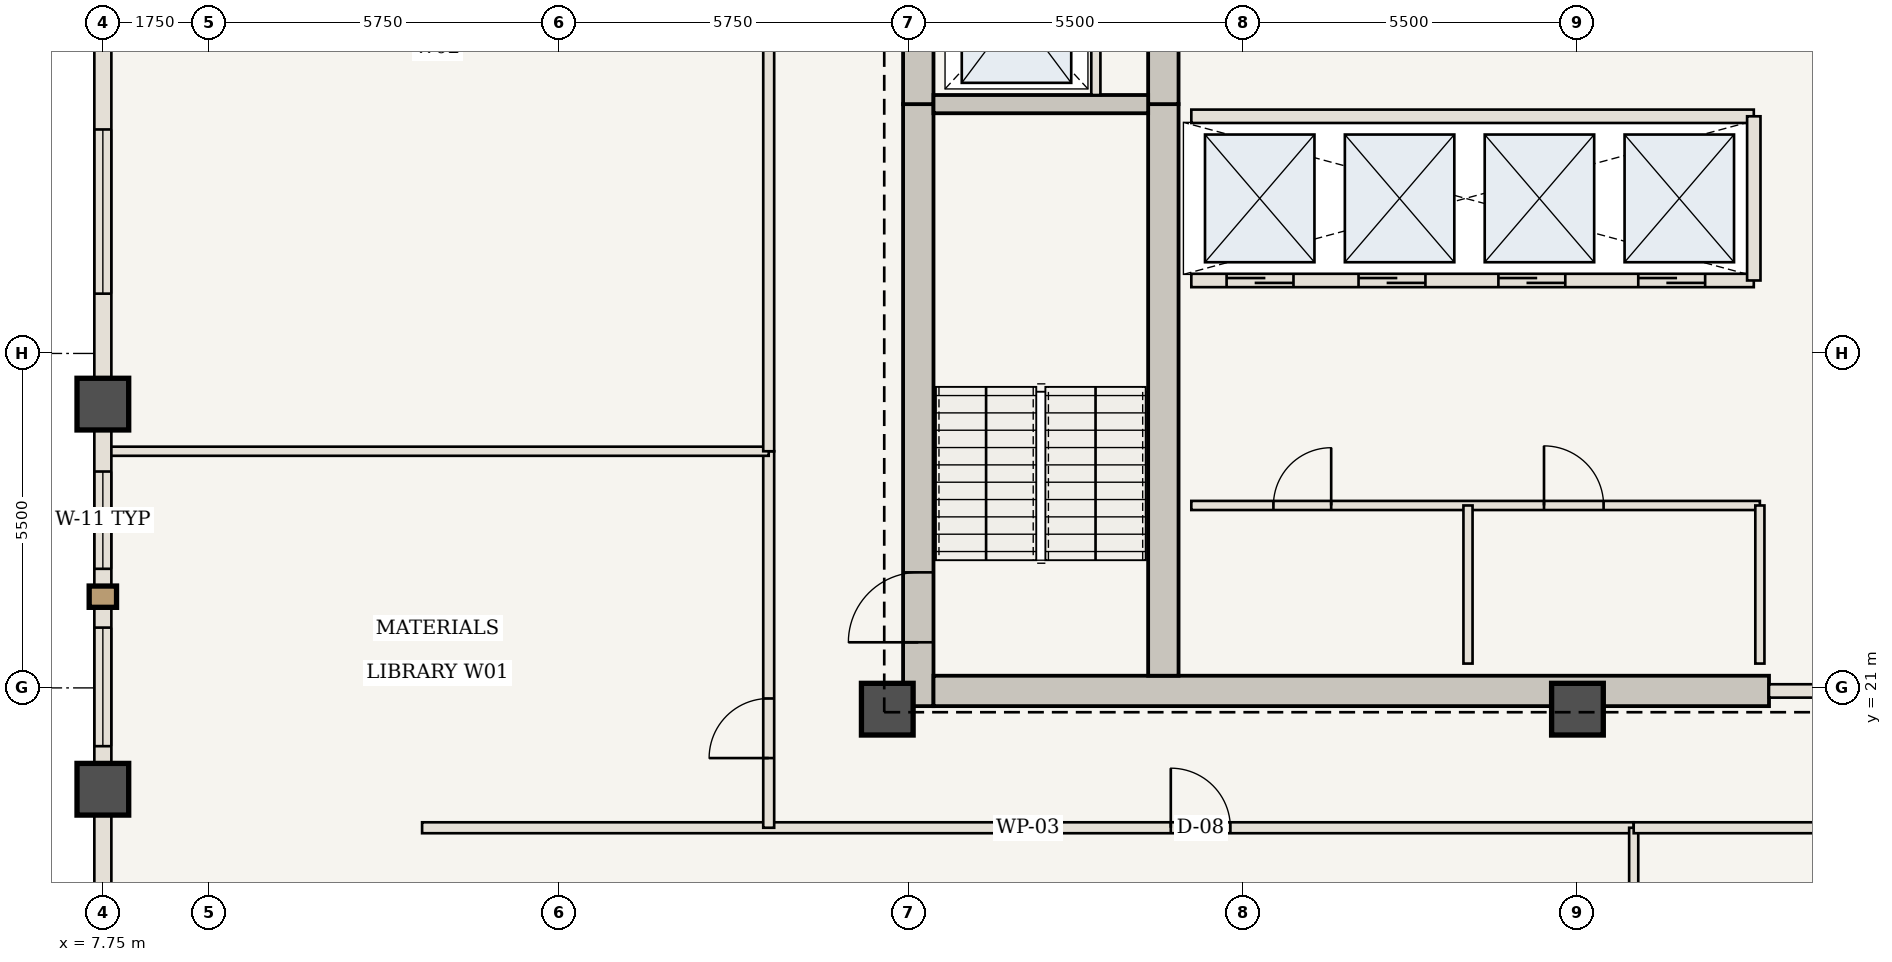
"""IFC4 building model, lengths in metres.
Left out: names, types, materials, properties, quantities, classifications, styles, units other than length and angle.
Written with IfcOpenShell. Run it as: python <this file> out.ifc"""

import sys

from ifc_helpers import new_model, si_unit, direction, frame, frame_2d, origin, origin_2d, place, context, subcontext, project, spatial, rectangle, extrude, element, fill, save


model = new_model("IFC4")
c1 = context("Model", 3, precision=1e-05, world=origin(), true_north=direction((0.0, 1.0)))
c2 = subcontext(c1, "Body", "Model", "MODEL_VIEW")
j1 = project(units=[si_unit("LENGTHUNIT", "METRE"), si_unit("PLANEANGLEUNIT", "RADIAN")], contexts=[c1])
p1 = place(None, origin())
s1 = spatial("IfcSite", under=j1, at=p1, CompositionType="ELEMENT")
p2 = place(p1, origin())
s2 = spatial("IfcBuilding", under=s1, at=p2, CompositionType="ELEMENT")
p3 = place(p2, frame((0.0, 0.0, 210.0)))
s3 = spatial("IfcBuildingStorey", under=s2, at=p3, CompositionType="ELEMENT", Elevation=210.0)
p4 = place(p3, frame((21.16, 20.7, 0.0), z_axis=(0.0, 0.0, 1.0), x_axis=(0.0, 1.0, 0.0)))
e1 = element("IfcWall", 1, at=p4, inside=s3, PredefinedType="SHEAR", context=c2, shape_type="SweptSolid", body=[
    extrude(rectangle(XDim=9.9, YDim=0.5, at=frame_2d((4.95, 0.0))), origin(), (0.0, 0.0, 1.0), 3.85),
])
p5 = place(p4, frame((1.05, 0.0, 0.0)))
e2 = element("IfcOpeningElement", 2, at=p5, cuts=e1, PredefinedType="OPENING", context=c2, shape_type="SweptSolid", body=[
    extrude(rectangle(XDim=1.15, YDim=2.15, at=frame_2d((0.575, 1.075))), frame((0.0, 0.26, 0.0), z_axis=(0.0, -1.0, 0.0), x_axis=(1.0, 0.0, 0.0)), (0.0, 0.0, 1.0), 0.52),
])
p6 = place(p3, frame((21.16, 30.6, 0.0), z_axis=(0.0, 0.0, 1.0), x_axis=(0.0, 1.0, 0.0)))
e3 = element("IfcWall", 3, at=p6, inside=s3, PredefinedType="SHEAR", context=c2, shape_type="SweptSolid", body=[
    extrude(rectangle(XDim=12.65, YDim=0.5, at=frame_2d((6.325, 0.0))), origin(), (0.0, 0.0, 1.0), 3.85),
])
p7 = place(p6, frame((4.2, 0.0, 0.0)))
e4 = element("IfcOpeningElement", 4, at=p7, cuts=e3, PredefinedType="OPENING", context=c2, shape_type="SweptSolid", body=[
    extrude(rectangle(XDim=1.1, YDim=2.15, at=frame_2d((0.55, 1.075))), frame((0.0, 0.26, 0.0), z_axis=(0.0, -1.0, 0.0), x_axis=(1.0, 0.0, 0.0)), (0.0, 0.0, 1.0), 0.52),
])
p8 = place(p6, frame((9.2, 0.0, 0.0)))
e5 = element("IfcOpeningElement", 5, at=p8, cuts=e3, PredefinedType="OPENING", context=c2, shape_type="SweptSolid", body=[
    extrude(rectangle(XDim=0.92, YDim=2.1, at=frame_2d((0.46, 1.05))), frame((0.0, 0.26, 0.0), z_axis=(0.0, -1.0, 0.0), x_axis=(1.0, 0.0, 0.0)), (0.0, 0.0, 1.0), 0.52),
])
p9 = place(p3, frame((21.41, 20.95, 0.0), z_axis=(0.0, 0.0, 1.0), x_axis=(1.0, 0.0, 0.0)))
e6 = element("IfcWall", 6, at=p9, inside=s3, PredefinedType="SHEAR", context=c2, shape_type="SweptSolid", body=[
    extrude(rectangle(XDim=13.74, YDim=0.5, at=frame_2d((6.87, 0.0))), origin(), (0.0, 0.0, 1.0), 3.85),
])
p10 = place(p3, frame((25.19, 21.2, 0.0), z_axis=(0.0, 0.0, 1.0), x_axis=(0.0, 1.0, 0.0)))
e7 = element("IfcWall", 7, at=p10, inside=s3, PredefinedType="SHEAR", context=c2, shape_type="SweptSolid", body=[
    extrude(rectangle(XDim=9.4, YDim=0.5, at=frame_2d((4.7, 0.0))), origin(), (0.0, 0.0, 1.0), 3.85),
])
p11 = place(p3, frame((25.19, 30.6, 0.0), z_axis=(0.0, 0.0, 1.0), x_axis=(0.0, 1.0, 0.0)))
e8 = element("IfcWall", 8, at=p11, inside=s3, PredefinedType="SHEAR", context=c2, shape_type="SweptSolid", body=[
    extrude(rectangle(XDim=12.15, YDim=0.5, at=frame_2d((6.075, 0.0))), origin(), (0.0, 0.0, 1.0), 3.85),
])
p12 = place(p11, frame((6.25, 0.0, 0.0)))
e9 = element("IfcOpeningElement", 9, at=p12, cuts=e8, PredefinedType="OPENING", context=c2, shape_type="SweptSolid", body=[
    extrude(rectangle(XDim=1.1, YDim=2.15, at=frame_2d((0.55, 1.075))), frame((0.0, 0.26, 0.0), z_axis=(0.0, -1.0, 0.0), x_axis=(1.0, 0.0, 0.0)), (0.0, 0.0, 1.0), 0.52),
])
for number, where, z_axis, x_axis in (
    (10, (20.65, 20.65, 0.0), (0.0, 0.0, 1.0), (1.0, 0.0, 0.0)),
    (11, (32.0, 20.65, 0.0), (0.0, 0.0, 1.0), (1.0, 0.0, 0.0)),
    (12, (7.75, 19.333, 0.0), (0.0, 0.0, 1.0), (1.0, 0.0, 0.0)),
    (13, (7.75, 25.667, 0.0), (0.0, 0.0, 1.0), (1.0, 0.0, 0.0)),
):
    element("IfcColumn", number, at=place(p3, frame(where, z_axis=z_axis, x_axis=x_axis)), inside=s3, PredefinedType="COLUMN", context=c2, shape_type="SweptSolid", body=[
        extrude(rectangle(XDim=0.85, YDim=0.85, at=origin_2d()), origin(), (0.0, 0.0, 1.0), 3.85),
    ])
p13 = place(p3, frame((21.41, 30.6, 0.0), z_axis=(0.0, 0.0, 1.0), x_axis=(1.0, 0.0, 0.0)))
e14 = element("IfcWall", 14, at=p13, inside=s3, PredefinedType="SHEAR", context=c2, shape_type="SweptSolid", body=[
    extrude(rectangle(XDim=3.53, YDim=0.3, at=frame_2d((1.765, 0.0))), origin(), (0.0, 0.0, 1.0), 3.685),
])
p14 = place(p3, frame((24.08, 30.75, 0.0), z_axis=(0.0, 0.0, 1.0), x_axis=(0.0, 1.0, 0.0)))
e15 = element("IfcWall", 15, at=p14, inside=s3, PredefinedType="STANDARD", context=c2, shape_type="SweptSolid", body=[
    extrude(rectangle(XDim=2.65, YDim=0.15, at=frame_2d((1.325, 0.0))), origin(), (0.0, 0.0, 1.0), 3.685),
])
p15 = place(p3, frame((35.15, 20.95, 0.0), z_axis=(0.0, 0.0, 1.0), x_axis=(1.0, 0.0, 0.0)))
e16 = element("IfcWall", 16, at=p15, inside=s3, PredefinedType="STANDARD", context=c2, shape_type="SweptSolid", body=[
    extrude(rectangle(XDim=3.3, YDim=0.22, at=frame_2d((1.65, 0.0))), origin(), (0.0, 0.0, 1.0), 3.685),
])
p16 = place(p15, frame((1.1, 0.0, 0.0)))
e17 = element("IfcOpeningElement", 17, at=p16, cuts=e16, PredefinedType="OPENING", context=c2, shape_type="SweptSolid", body=[
    extrude(rectangle(XDim=1.1, YDim=2.15, at=frame_2d((0.55, 1.075))), frame((0.0, 0.12, 0.0), z_axis=(0.0, -1.0, 0.0), x_axis=(1.0, 0.0, 0.0)), (0.0, 0.0, 1.0), 0.24),
])
p17 = place(p3, frame((25.65, 24.0, 0.0), z_axis=(0.0, 0.0, 1.0), x_axis=(1.0, 0.0, 0.0)))
e18 = element("IfcWall", 18, at=p17, inside=s3, PredefinedType="STANDARD", context=c2, shape_type="SweptSolid", body=[
    extrude(rectangle(XDim=9.35, YDim=0.15, at=frame_2d((4.675, 0.0))), origin(), (0.0, 0.0, 1.0), 3.685),
])
p18 = place(p17, frame((1.35, 0.0, 0.0)))
e19 = element("IfcOpeningElement", 19, at=p18, cuts=e18, PredefinedType="OPENING", context=c2, shape_type="SweptSolid", body=[
    extrude(rectangle(XDim=0.95, YDim=2.15, at=frame_2d((0.475, 1.075))), frame((0.0, 0.085, 0.0), z_axis=(0.0, -1.0, 0.0), x_axis=(1.0, 0.0, 0.0)), (0.0, 0.0, 1.0), 0.17),
])
p19 = place(p17, frame((5.8, 0.0, 0.0)))
e20 = element("IfcOpeningElement", 20, at=p19, cuts=e18, PredefinedType="OPENING", context=c2, shape_type="SweptSolid", body=[
    extrude(rectangle(XDim=0.98, YDim=2.2, at=frame_2d((0.49, 1.1))), frame((0.0, 0.085, 0.0), z_axis=(0.0, -1.0, 0.0), x_axis=(1.0, 0.0, 0.0)), (0.0, 0.0, 1.0), 0.17),
])
for number, where, z_axis, x_axis in (
    (21, (30.2, 21.4, 0.0), (0.0, 0.0, 1.0), (0.0, 1.0, 0.0)),
    (22, (35.0, 21.4, 0.0), (0.0, 0.0, 1.0), (0.0, 1.0, 0.0)),
):
    element("IfcWall", number, at=place(p3, frame(where, z_axis=z_axis, x_axis=x_axis)), inside=s3, PredefinedType="STANDARD", context=c2, shape_type="SweptSolid", body=[
        extrude(rectangle(XDim=2.6, YDim=0.15, at=frame_2d((1.3, 0.0))), origin(), (0.0, 0.0, 1.0), 3.685),
    ])
p20 = place(p3, frame((25.65, 27.7, 0.0), z_axis=(0.0, 0.0, 1.0), x_axis=(1.0, 0.0, 0.0)))
e23 = element("IfcWall", 23, at=p20, inside=s3, PredefinedType="STANDARD", context=c2, shape_type="SweptSolid", body=[
    extrude(rectangle(XDim=9.25, YDim=0.22, at=frame_2d((4.625, 0.0))), origin(), (0.0, 0.0, 1.0), 3.685),
])
p21 = place(p20, frame((0.58, 0.0, 0.0)))
e24 = element("IfcOpeningElement", 24, at=p21, cuts=e23, PredefinedType="OPENING", context=c2, shape_type="SweptSolid", body=[
    extrude(rectangle(XDim=1.1, YDim=2.15, at=frame_2d((0.55, 1.075))), frame((0.0, 0.12, 0.0), z_axis=(0.0, -1.0, 0.0), x_axis=(1.0, 0.0, 0.0)), (0.0, 0.0, 1.0), 0.24),
])
p22 = place(p20, frame((2.75, 0.0, 0.0)))
e25 = element("IfcOpeningElement", 25, at=p22, cuts=e23, PredefinedType="OPENING", context=c2, shape_type="SweptSolid", body=[
    extrude(rectangle(XDim=1.1, YDim=2.15, at=frame_2d((0.55, 1.075))), frame((0.0, 0.12, 0.0), z_axis=(0.0, -1.0, 0.0), x_axis=(1.0, 0.0, 0.0)), (0.0, 0.0, 1.0), 0.24),
])
p23 = place(p20, frame((5.05, 0.0, 0.0)))
e26 = element("IfcOpeningElement", 26, at=p23, cuts=e23, PredefinedType="OPENING", context=c2, shape_type="SweptSolid", body=[
    extrude(rectangle(XDim=1.1, YDim=2.15, at=frame_2d((0.55, 1.075))), frame((0.0, 0.12, 0.0), z_axis=(0.0, -1.0, 0.0), x_axis=(1.0, 0.0, 0.0)), (0.0, 0.0, 1.0), 0.24),
])
p24 = place(p20, frame((7.35, 0.0, 0.0)))
e27 = element("IfcOpeningElement", 27, at=p24, cuts=e23, PredefinedType="OPENING", context=c2, shape_type="SweptSolid", body=[
    extrude(rectangle(XDim=1.1, YDim=2.15, at=frame_2d((0.55, 1.075))), frame((0.0, 0.12, 0.0), z_axis=(0.0, -1.0, 0.0), x_axis=(1.0, 0.0, 0.0)), (0.0, 0.0, 1.0), 0.24),
])
p25 = place(p3, frame((25.65, 30.4, 0.0), z_axis=(0.0, 0.0, 1.0), x_axis=(1.0, 0.0, 0.0)))
e28 = element("IfcWall", 28, at=p25, inside=s3, PredefinedType="STANDARD", context=c2, shape_type="SweptSolid", body=[
    extrude(rectangle(XDim=9.25, YDim=0.22, at=frame_2d((4.625, 0.0))), origin(), (0.0, 0.0, 1.0), 3.685),
])
p26 = place(p3, frame((34.9, 27.7, 0.0), z_axis=(0.0, 0.0, 1.0), x_axis=(0.0, 1.0, 0.0)))
e29 = element("IfcWall", 29, at=p26, inside=s3, PredefinedType="STANDARD", context=c2, shape_type="SweptSolid", body=[
    extrude(rectangle(XDim=2.7, YDim=0.22, at=frame_2d((1.35, 0.0))), origin(), (0.0, 0.0, 1.0), 3.685),
])
p27 = place(p3, frame((13.0, 18.7, 0.0), z_axis=(0.0, 0.0, 1.0), x_axis=(1.0, 0.0, 0.0)))
e30 = element("IfcWall", 30, at=p27, inside=s3, PredefinedType="STANDARD", context=c2, shape_type="SweptSolid", body=[
    extrude(rectangle(XDim=19.925, YDim=0.18, at=frame_2d((9.962, 0.0))), origin(), (0.0, 0.0, 1.0), 3.685),
])
p28 = place(p27, frame((12.312, 0.0, 0.0)))
e31 = element("IfcOpeningElement", 31, at=p28, cuts=e30, PredefinedType="OPENING", context=c2, shape_type="SweptSolid", body=[
    extrude(rectangle(XDim=0.98, YDim=2.2, at=frame_2d((0.49, 1.1))), frame((0.0, 0.1, 0.0), z_axis=(0.0, -1.0, 0.0), x_axis=(1.0, 0.0, 0.0)), (0.0, 0.0, 1.0), 0.2),
])
p29 = place(p3, frame((32.925, 7.81, 0.0), z_axis=(0.0, 0.0, 1.0), x_axis=(0.0, 1.0, 0.0)))
e32 = element("IfcWall", 32, at=p29, inside=s3, PredefinedType="STANDARD", context=c2, shape_type="SweptSolid", body=[
    extrude(rectangle(XDim=10.89, YDim=0.15, at=frame_2d((5.445, 0.0))), origin(), (0.0, 0.0, 1.0), 3.685),
])
p30 = place(p3, frame((32.925, 18.7, 0.0), z_axis=(0.0, 0.0, 1.0), x_axis=(1.0, 0.0, 0.0)))
e33 = element("IfcWall", 33, at=p30, inside=s3, PredefinedType="STANDARD", context=c2, shape_type="SweptSolid", body=[
    extrude(rectangle(XDim=18.075, YDim=0.18, at=frame_2d((9.038, 0.0))), origin(), (0.0, 0.0, 1.0), 3.685),
])
p31 = place(p30, frame((5.812, 0.0, 0.0)))
e34 = element("IfcOpeningElement", 34, at=p31, cuts=e33, PredefinedType="OPENING", context=c2, shape_type="SweptSolid", body=[
    extrude(rectangle(XDim=0.98, YDim=2.2, at=frame_2d((0.49, 1.1))), frame((0.0, 0.1, 0.0), z_axis=(0.0, -1.0, 0.0), x_axis=(1.0, 0.0, 0.0)), (0.0, 0.0, 1.0), 0.2),
])
p32 = place(p3, frame((18.7, 18.7, 0.0), z_axis=(0.0, 0.0, 1.0), x_axis=(0.0, 1.0, 0.0)))
e35 = element("IfcWall", 35, at=p32, inside=s3, PredefinedType="STANDARD", context=c2, shape_type="SweptSolid", body=[
    extrude(rectangle(XDim=6.192, YDim=0.18, at=frame_2d((3.096, 0.0))), origin(), (0.0, 0.0, 1.0), 3.685),
])
p33 = place(p32, frame((1.146, 0.0, 0.0)))
e36 = element("IfcOpeningElement", 36, at=p33, cuts=e35, PredefinedType="OPENING", context=c2, shape_type="SweptSolid", body=[
    extrude(rectangle(XDim=0.98, YDim=2.2, at=frame_2d((0.49, 1.1))), frame((0.0, 0.1, 0.0), z_axis=(0.0, -1.0, 0.0), x_axis=(1.0, 0.0, 0.0)), (0.0, 0.0, 1.0), 0.2),
])
p34 = place(p3, frame((7.81, 24.892, 0.0), z_axis=(0.0, 0.0, 1.0), x_axis=(1.0, 0.0, 0.0)))
e37 = element("IfcWall", 37, at=p34, inside=s3, PredefinedType="STANDARD", context=c2, shape_type="SweptSolid", body=[
    extrude(rectangle(XDim=10.89, YDim=0.15, at=frame_2d((5.445, 0.0))), origin(), (0.0, 0.0, 1.0), 3.685),
])
p35 = place(p3, frame((18.7, 24.892, 0.0), z_axis=(0.0, 0.0, 1.0), x_axis=(0.0, 1.0, 0.0)))
e38 = element("IfcWall", 38, at=p35, inside=s3, PredefinedType="STANDARD", context=c2, shape_type="SweptSolid", body=[
    extrude(rectangle(XDim=14.367, YDim=0.18, at=frame_2d((7.183, 0.0))), origin(), (0.0, 0.0, 1.0), 3.685),
])
p36 = place(p35, frame((8.133, 0.0, 0.0)))
e39 = element("IfcOpeningElement", 39, at=p36, cuts=e38, PredefinedType="OPENING", context=c2, shape_type="SweptSolid", body=[
    extrude(rectangle(XDim=0.98, YDim=2.2, at=frame_2d((0.49, 1.1))), frame((0.0, 0.1, 0.0), z_axis=(0.0, -1.0, 0.0), x_axis=(1.0, 0.0, 0.0)), (0.0, 0.0, 1.0), 0.2),
])
p37 = place(p3, frame((7.75, 13.0, 0.0), z_axis=(0.0, 0.0, 1.0), x_axis=(0.0, 1.0, 0.0)))
e40 = element("IfcWall", 40, at=p37, inside=s3, PredefinedType="USERDEFINED", context=c2, shape_type="SweptSolid", body=[
    extrude(rectangle(XDim=6.333, YDim=0.28, at=frame_2d((3.167, 0.0))), origin(), (0.0, 0.0, 1.0), 2.985),
])
p38 = place(p3, frame((7.75, 19.333, 0.0), z_axis=(0.0, 0.0, 1.0), x_axis=(0.0, 1.0, 0.0)))
e41 = element("IfcWall", 41, at=p38, inside=s3, PredefinedType="USERDEFINED", context=c2, shape_type="SweptSolid", body=[
    extrude(rectangle(XDim=6.333, YDim=0.28, at=frame_2d((3.167, 0.0))), origin(), (0.0, 0.0, 1.0), 2.985),
])
p39 = place(p38, frame((0.708, 0.0, 0.85)))
e42 = element("IfcOpeningElement", 42, at=p39, cuts=e41, PredefinedType="OPENING", context=c2, shape_type="SweptSolid", body=[
    extrude(rectangle(XDim=1.95, YDim=1.935, at=frame_2d((0.975, 0.968))), frame((0.0, 0.15, 0.0), z_axis=(0.0, -1.0, 0.0), x_axis=(1.0, 0.0, 0.0)), (0.0, 0.0, 1.0), 0.3),
])
p40 = place(p38, frame((3.625, 0.0, 0.85)))
e43 = element("IfcOpeningElement", 43, at=p40, cuts=e41, PredefinedType="OPENING", context=c2, shape_type="SweptSolid", body=[
    extrude(rectangle(XDim=1.6, YDim=1.935, at=frame_2d((0.8, 0.968))), frame((0.0, 0.15, 0.0), z_axis=(0.0, -1.0, 0.0), x_axis=(1.0, 0.0, 0.0)), (0.0, 0.0, 1.0), 0.3),
])
p41 = place(p3, frame((7.75, 25.667, 0.0), z_axis=(0.0, 0.0, 1.0), x_axis=(0.0, 1.0, 0.0)))
e44 = element("IfcWall", 44, at=p41, inside=s3, PredefinedType="USERDEFINED", context=c2, shape_type="SweptSolid", body=[
    extrude(rectangle(XDim=6.333, YDim=0.28, at=frame_2d((3.167, 0.0))), origin(), (0.0, 0.0, 1.0), 2.985),
])
p42 = place(p41, frame((1.817, 0.0, 0.85)))
e45 = element("IfcOpeningElement", 45, at=p42, cuts=e44, PredefinedType="OPENING", context=c2, shape_type="SweptSolid", body=[
    extrude(rectangle(XDim=2.7, YDim=1.935, at=frame_2d((1.35, 0.968))), frame((0.0, 0.15, 0.0), z_axis=(0.0, -1.0, 0.0), x_axis=(1.0, 0.0, 0.0)), (0.0, 0.0, 1.0), 0.3),
])
p43 = place(p5, origin())
e46 = element("IfcDoor", 46, at=p43, inside=s3, OperationType="SINGLE_SWING_LEFT", PredefinedType="DOOR", context=c2, shape_type="SweptSolid", body=[
    extrude(rectangle(XDim=1.15, YDim=2.15, at=frame_2d((0.575, 1.075))), frame((0.0, 0.025, 0.0), z_axis=(0.0, -1.0, 0.0), x_axis=(1.0, 0.0, 0.0)), (0.0, 0.0, 1.0), 0.05),
])
fill(e2, e46)
p44 = place(p18, origin())
e47 = element("IfcDoor", 47, at=p44, inside=s3, OperationType="SINGLE_SWING_RIGHT", PredefinedType="DOOR", context=c2, shape_type="SweptSolid", body=[
    extrude(rectangle(XDim=0.95, YDim=2.15, at=frame_2d((0.475, 1.075))), frame((0.0, 0.025, 0.0), z_axis=(0.0, -1.0, 0.0), x_axis=(1.0, 0.0, 0.0)), (0.0, 0.0, 1.0), 0.05),
])
fill(e19, e47)
p45 = place(p19, origin())
e48 = element("IfcDoor", 48, at=p45, inside=s3, OperationType="SINGLE_SWING_LEFT", PredefinedType="DOOR", context=c2, shape_type="SweptSolid", body=[
    extrude(rectangle(XDim=0.98, YDim=2.2, at=frame_2d((0.49, 1.1))), frame((0.0, 0.025, 0.0), z_axis=(0.0, -1.0, 0.0), x_axis=(1.0, 0.0, 0.0)), (0.0, 0.0, 1.0), 0.05),
])
fill(e20, e48)
p46 = place(p21, origin())
e49 = element("IfcDoor", 49, at=p46, inside=s3, OperationType="DOUBLE_DOOR_SLIDING", PredefinedType="DOOR", context=c2, shape_type="SweptSolid", body=[
    extrude(rectangle(XDim=1.1, YDim=2.15, at=frame_2d((0.55, 1.075))), frame((0.0, 0.025, 0.0), z_axis=(0.0, -1.0, 0.0), x_axis=(1.0, 0.0, 0.0)), (0.0, 0.0, 1.0), 0.05),
])
fill(e24, e49)
p47 = place(p22, origin())
e50 = element("IfcDoor", 50, at=p47, inside=s3, OperationType="DOUBLE_DOOR_SLIDING", PredefinedType="DOOR", context=c2, shape_type="SweptSolid", body=[
    extrude(rectangle(XDim=1.1, YDim=2.15, at=frame_2d((0.55, 1.075))), frame((0.0, 0.025, 0.0), z_axis=(0.0, -1.0, 0.0), x_axis=(1.0, 0.0, 0.0)), (0.0, 0.0, 1.0), 0.05),
])
fill(e25, e50)
p48 = place(p23, origin())
e51 = element("IfcDoor", 51, at=p48, inside=s3, OperationType="DOUBLE_DOOR_SLIDING", PredefinedType="DOOR", context=c2, shape_type="SweptSolid", body=[
    extrude(rectangle(XDim=1.1, YDim=2.15, at=frame_2d((0.55, 1.075))), frame((0.0, 0.025, 0.0), z_axis=(0.0, -1.0, 0.0), x_axis=(1.0, 0.0, 0.0)), (0.0, 0.0, 1.0), 0.05),
])
fill(e26, e51)
p49 = place(p24, origin())
e52 = element("IfcDoor", 52, at=p49, inside=s3, OperationType="DOUBLE_DOOR_SLIDING", PredefinedType="DOOR", context=c2, shape_type="SweptSolid", body=[
    extrude(rectangle(XDim=1.1, YDim=2.15, at=frame_2d((0.55, 1.075))), frame((0.0, 0.025, 0.0), z_axis=(0.0, -1.0, 0.0), x_axis=(1.0, 0.0, 0.0)), (0.0, 0.0, 1.0), 0.05),
])
fill(e27, e52)
p50 = place(p28, origin())
e53 = element("IfcDoor", 53, at=p50, inside=s3, OperationType="SINGLE_SWING_LEFT", PredefinedType="DOOR", context=c2, shape_type="SweptSolid", body=[
    extrude(rectangle(XDim=0.98, YDim=2.2, at=frame_2d((0.49, 1.1))), frame((0.0, 0.025, 0.0), z_axis=(0.0, -1.0, 0.0), x_axis=(1.0, 0.0, 0.0)), (0.0, 0.0, 1.0), 0.05),
])
fill(e31, e53)
p51 = place(p33, origin())
e54 = element("IfcDoor", 54, at=p51, inside=s3, OperationType="SINGLE_SWING_LEFT", PredefinedType="DOOR", context=c2, shape_type="SweptSolid", body=[
    extrude(rectangle(XDim=0.98, YDim=2.2, at=frame_2d((0.49, 1.1))), frame((0.0, 0.025, 0.0), z_axis=(0.0, -1.0, 0.0), x_axis=(1.0, 0.0, 0.0)), (0.0, 0.0, 1.0), 0.05),
])
fill(e36, e54)
p52 = place(p39, origin())
e55 = element("IfcWindow", 55, at=p52, inside=s3, PartitioningType="SINGLE_PANEL", PredefinedType="WINDOW", context=c2, shape_type="SweptSolid", body=[
    extrude(rectangle(XDim=1.95, YDim=1.935, at=frame_2d((0.975, 0.968))), frame((0.0, 0.03, 0.0), z_axis=(0.0, -1.0, 0.0), x_axis=(1.0, 0.0, 0.0)), (0.0, 0.0, 1.0), 0.06),
])
fill(e42, e55)
p53 = place(p40, origin())
e56 = element("IfcWindow", 56, at=p53, inside=s3, PartitioningType="SINGLE_PANEL", PredefinedType="WINDOW", context=c2, shape_type="SweptSolid", body=[
    extrude(rectangle(XDim=1.6, YDim=1.935, at=frame_2d((0.8, 0.968))), frame((0.0, 0.03, 0.0), z_axis=(0.0, -1.0, 0.0), x_axis=(1.0, 0.0, 0.0)), (0.0, 0.0, 1.0), 0.06),
])
fill(e43, e56)
p54 = place(p42, origin())
e57 = element("IfcWindow", 57, at=p54, inside=s3, PartitioningType="SINGLE_PANEL", PredefinedType="WINDOW", context=c2, shape_type="SweptSolid", body=[
    extrude(rectangle(XDim=2.7, YDim=1.935, at=frame_2d((1.35, 0.968))), frame((0.0, 0.03, 0.0), z_axis=(0.0, -1.0, 0.0), x_axis=(1.0, 0.0, 0.0)), (0.0, 0.0, 1.0), 0.06),
])
fill(e45, e57)
save(model, sys.argv[1])
